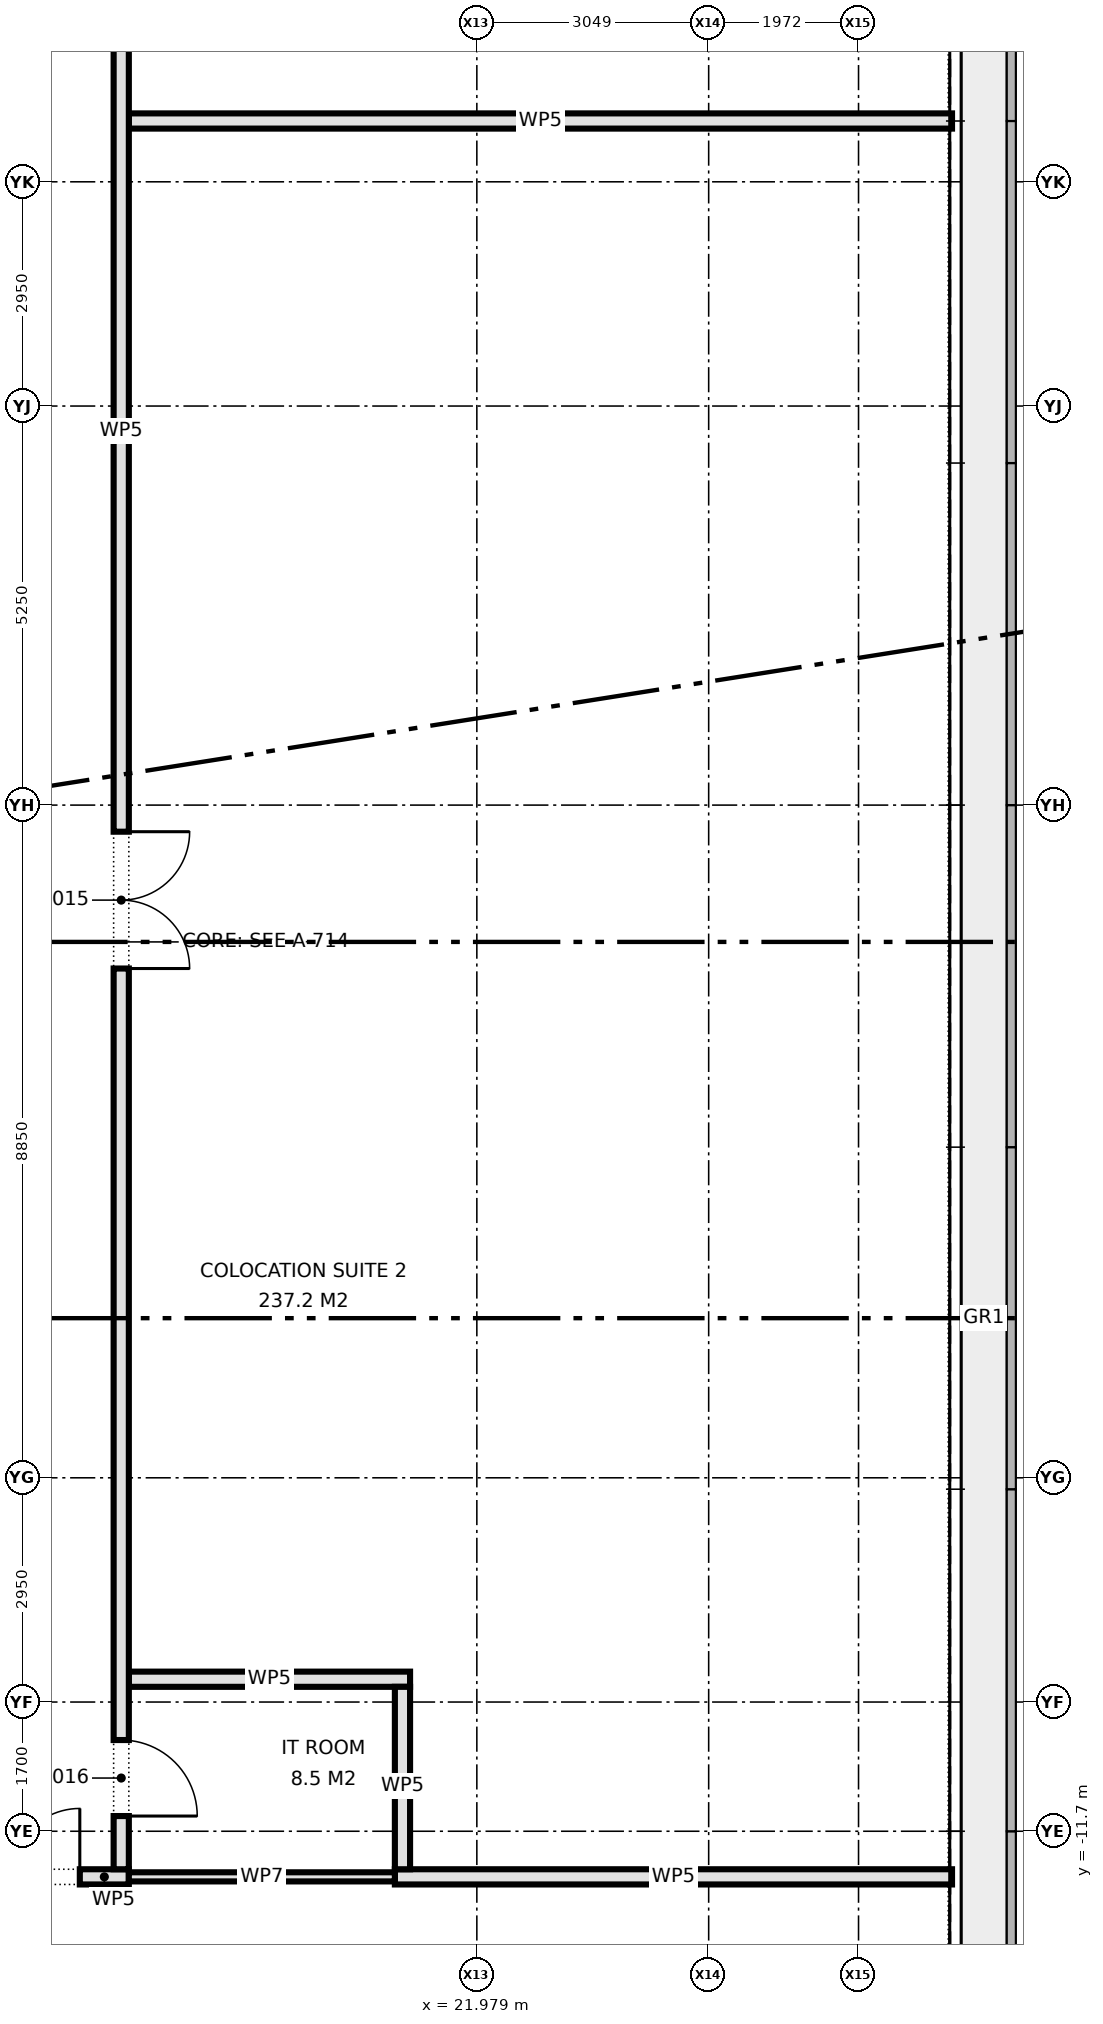
"""IFC4 building model, lengths in metres.
Left out: names, types, materials, properties, quantities, classifications, styles, units other than length and angle.
Written with IfcOpenShell. Run it as: python <this file> out.ifc"""

import sys

from ifc_helpers import new_model, si_unit, direction, frame, frame_2d, origin, place, context, subcontext, project, spatial, rectangle, extrude, element, fill, save


model = new_model("IFC4")
c1 = context("Model", 3, precision=1e-05, world=origin(), true_north=direction((0.0, 1.0)))
c2 = subcontext(c1, "Body", "Model", "MODEL_VIEW")
j1 = project(units=[si_unit("LENGTHUNIT", "METRE"), si_unit("PLANEANGLEUNIT", "RADIAN")], contexts=[c1])
p1 = place(None, origin())
s1 = spatial("IfcSite", under=j1, at=p1, CompositionType="ELEMENT")
p2 = place(p1, origin())
s2 = spatial("IfcBuilding", under=s1, at=p2, CompositionType="ELEMENT")
p3 = place(p2, frame((0.0, 0.0, 108.4)))
s3 = spatial("IfcBuildingStorey", under=s2, at=p3, CompositionType="ELEMENT", Elevation=108.4)
p4 = place(p3, frame((-20.33, -12.3, 0.0), z_axis=(0.0, 0.0, 1.0), x_axis=(1.0, 0.0, 0.0)))
e1 = element("IfcWall", 1, at=p4, inside=s3, PredefinedType="PARTITIONING", context=c2, shape_type="SweptSolid", body=[
    extrude(rectangle(XDim=37.73, YDim=0.2, at=frame_2d((18.865, 0.0))), origin(), (0.0, 0.0, 1.0), 4.15),
])
p5 = place(p4, frame((3.69, 0.0, 0.0)))
e2 = element("IfcOpeningElement", 2, at=p5, cuts=e1, PredefinedType="OPENING", context=c2, shape_type="SweptSolid", body=[
    extrude(rectangle(XDim=1.2, YDim=2.1, at=frame_2d((0.6, 1.05))), frame((0.0, 0.11, 0.0), z_axis=(0.0, -1.0, 0.0), x_axis=(1.0, 0.0, 0.0)), (0.0, 0.0, 1.0), 0.22),
])
p6 = place(p4, frame((12.13, 0.0, 0.0)))
e3 = element("IfcOpeningElement", 3, at=p6, cuts=e1, PredefinedType="OPENING", context=c2, shape_type="SweptSolid", body=[
    extrude(rectangle(XDim=1.8, YDim=2.1, at=frame_2d((0.9, 1.05))), frame((0.0, 0.11, 0.0), z_axis=(0.0, -1.0, 0.0), x_axis=(1.0, 0.0, 0.0)), (0.0, 0.0, 1.0), 0.22),
])
p7 = place(p4, frame((21.43, 0.0, 0.0)))
e4 = element("IfcOpeningElement", 4, at=p7, cuts=e1, PredefinedType="OPENING", context=c2, shape_type="SweptSolid", body=[
    extrude(rectangle(XDim=1.2, YDim=2.1, at=frame_2d((0.6, 1.05))), frame((0.0, 0.11, 0.0), z_axis=(0.0, -1.0, 0.0), x_axis=(1.0, 0.0, 0.0)), (0.0, 0.0, 1.0), 0.22),
])
p8 = place(p4, frame((35.285, 0.0, 0.0)))
e5 = element("IfcOpeningElement", 5, at=p8, cuts=e1, PredefinedType="OPENING", context=c2, shape_type="SweptSolid", body=[
    extrude(rectangle(XDim=1.8, YDim=2.1, at=frame_2d((0.9, 1.05))), frame((0.0, 0.11, 0.0), z_axis=(0.0, -1.0, 0.0), x_axis=(1.0, 0.0, 0.0)), (0.0, 0.0, 1.0), 0.22),
])
p9 = place(p4, frame((27.53, 0.0, 0.0)))
e6 = element("IfcOpeningElement", 6, at=p9, cuts=e1, PredefinedType="OPENING", context=c2, shape_type="SweptSolid", body=[
    extrude(rectangle(XDim=1.0, YDim=2.1, at=frame_2d((0.5, 1.05))), frame((0.0, 0.11, 0.0), z_axis=(0.0, -1.0, 0.0), x_axis=(1.0, 0.0, 0.0)), (0.0, 0.0, 1.0), 0.22),
])
p10 = place(p4, frame((30.53, 0.0, 0.0)))
e7 = element("IfcOpeningElement", 7, at=p10, cuts=e1, PredefinedType="OPENING", context=c2, shape_type="SweptSolid", body=[
    extrude(rectangle(XDim=1.0, YDim=2.1, at=frame_2d((0.5, 1.05))), frame((0.0, 0.11, 0.0), z_axis=(0.0, -1.0, 0.0), x_axis=(1.0, 0.0, 0.0)), (0.0, 0.0, 1.0), 0.22),
])
p11 = place(p4, frame((33.13, 0.0, 0.0)))
e8 = element("IfcOpeningElement", 8, at=p11, cuts=e1, PredefinedType="OPENING", context=c2, shape_type="SweptSolid", body=[
    extrude(rectangle(XDim=1.0, YDim=2.1, at=frame_2d((0.5, 1.05))), frame((0.0, 0.11, 0.0), z_axis=(0.0, -1.0, 0.0), x_axis=(1.0, 0.0, 0.0)), (0.0, 0.0, 1.0), 0.22),
])
p12 = place(p3, frame((20.9, -12.3, 0.0), z_axis=(0.0, 0.0, 1.0), x_axis=(1.0, 0.0, 0.0)))
e9 = element("IfcWall", 9, at=p12, inside=s3, PredefinedType="PARTITIONING", context=c2, shape_type="SweptSolid", body=[
    extrude(rectangle(XDim=7.33, YDim=0.2, at=frame_2d((3.665, 0.0))), origin(), (0.0, 0.0, 1.0), 4.15),
])
p13 = place(p3, frame((17.4, -9.7, 0.0), z_axis=(0.0, 0.0, 1.0), x_axis=(1.0, 0.0, 0.0)))
e10 = element("IfcWall", 10, at=p13, inside=s3, PredefinedType="PARTITIONING", context=c2, shape_type="SweptSolid", body=[
    extrude(rectangle(XDim=3.7, YDim=0.2, at=frame_2d((1.85, 0.0))), origin(), (0.0, 0.0, 1.0), 4.15),
])
p14 = place(p3, frame((17.4, 10.8, 0.0), z_axis=(0.0, 0.0, 1.0), x_axis=(1.0, 0.0, 0.0)))
e11 = element("IfcWall", 11, at=p14, inside=s3, PredefinedType="PARTITIONING", context=c2, shape_type="SweptSolid", body=[
    extrude(rectangle(XDim=10.83, YDim=0.2, at=frame_2d((5.415, 0.0))), origin(), (0.0, 0.0, 1.0), 4.15),
])
p15 = place(p3, frame((21.0, -12.2, 0.0), z_axis=(0.0, 0.0, 1.0), x_axis=(0.0, 1.0, 0.0)))
e12 = element("IfcWall", 12, at=p15, inside=s3, PredefinedType="PARTITIONING", context=c2, shape_type="SweptSolid", body=[
    extrude(rectangle(XDim=2.4, YDim=0.2, at=frame_2d((1.2, 0.0))), origin(), (0.0, 0.0, 1.0), 4.15),
])
p16 = place(p3, frame((17.3, -12.2, 0.0), z_axis=(0.0, 0.0, 1.0), x_axis=(0.0, 1.0, 0.0)))
e13 = element("IfcWall", 13, at=p16, inside=s3, PredefinedType="PARTITIONING", context=c2, shape_type="SweptSolid", body=[
    extrude(rectangle(XDim=24.4, YDim=0.2, at=frame_2d((12.2, 0.0))), origin(), (0.0, 0.0, 1.0), 4.15),
])
p17 = place(p16, frame((11.85, 0.0, 0.0)))
e14 = element("IfcOpeningElement", 14, at=p17, cuts=e13, PredefinedType="OPENING", context=c2, shape_type="SweptSolid", body=[
    extrude(rectangle(XDim=1.8, YDim=2.1, at=frame_2d((0.9, 1.05))), frame((0.0, 0.11, 0.0), z_axis=(0.0, -1.0, 0.0), x_axis=(1.0, 0.0, 0.0)), (0.0, 0.0, 1.0), 0.22),
])
p18 = place(p16, frame((0.7, 0.0, 0.0)))
e15 = element("IfcOpeningElement", 15, at=p18, cuts=e13, PredefinedType="OPENING", context=c2, shape_type="SweptSolid", body=[
    extrude(rectangle(XDim=1.0, YDim=2.1, at=frame_2d((0.5, 1.05))), frame((0.0, 0.11, 0.0), z_axis=(0.0, -1.0, 0.0), x_axis=(1.0, 0.0, 0.0)), (0.0, 0.0, 1.0), 0.22),
])
p19 = place(p3, frame((17.4, -12.3, 0.0), z_axis=(0.0, 0.0, 1.0), x_axis=(1.0, 0.0, 0.0)))
e16 = element("IfcWall", 16, at=p19, inside=s3, PredefinedType="PARTITIONING", context=c2, shape_type="SweptSolid", body=[
    extrude(rectangle(XDim=3.5, YDim=0.12, at=frame_2d((1.75, 0.0))), origin(), (0.0, 0.0, 1.0), 4.15),
])
p20 = place(p8, origin())
e17 = element("IfcDoor", 17, at=p20, inside=s3, OperationType="DOUBLE_DOOR_SINGLE_SWING", PredefinedType="DOOR", context=c2, shape_type="SweptSolid", body=[
    extrude(rectangle(XDim=1.8, YDim=2.1, at=frame_2d((0.9, 1.05))), frame((0.0, 0.025, 0.0), z_axis=(0.0, -1.0, 0.0), x_axis=(1.0, 0.0, 0.0)), (0.0, 0.0, 1.0), 0.05),
])
fill(e5, e17)
p21 = place(p17, frame((1.8, 0.0, 0.0), z_axis=(0.0, 0.0, 1.0), x_axis=(-1.0, 0.0, 0.0)))
e18 = element("IfcDoor", 18, at=p21, inside=s3, OperationType="DOUBLE_DOOR_SINGLE_SWING", PredefinedType="DOOR", context=c2, shape_type="SweptSolid", body=[
    extrude(rectangle(XDim=1.8, YDim=2.1, at=frame_2d((0.9, 1.05))), frame((0.0, 0.025, 0.0), z_axis=(0.0, -1.0, 0.0), x_axis=(1.0, 0.0, 0.0)), (0.0, 0.0, 1.0), 0.05),
])
fill(e14, e18)
p22 = place(p18, frame((1.0, 0.0, 0.0), z_axis=(0.0, 0.0, 1.0), x_axis=(-1.0, 0.0, 0.0)))
e19 = element("IfcDoor", 19, at=p22, inside=s3, OperationType="SINGLE_SWING_RIGHT", PredefinedType="DOOR", context=c2, shape_type="SweptSolid", body=[
    extrude(rectangle(XDim=1.0, YDim=2.1, at=frame_2d((0.5, 1.05))), frame((0.0, 0.025, 0.0), z_axis=(0.0, -1.0, 0.0), x_axis=(1.0, 0.0, 0.0)), (0.0, 0.0, 1.0), 0.05),
])
fill(e15, e19)
save(model, sys.argv[1])
